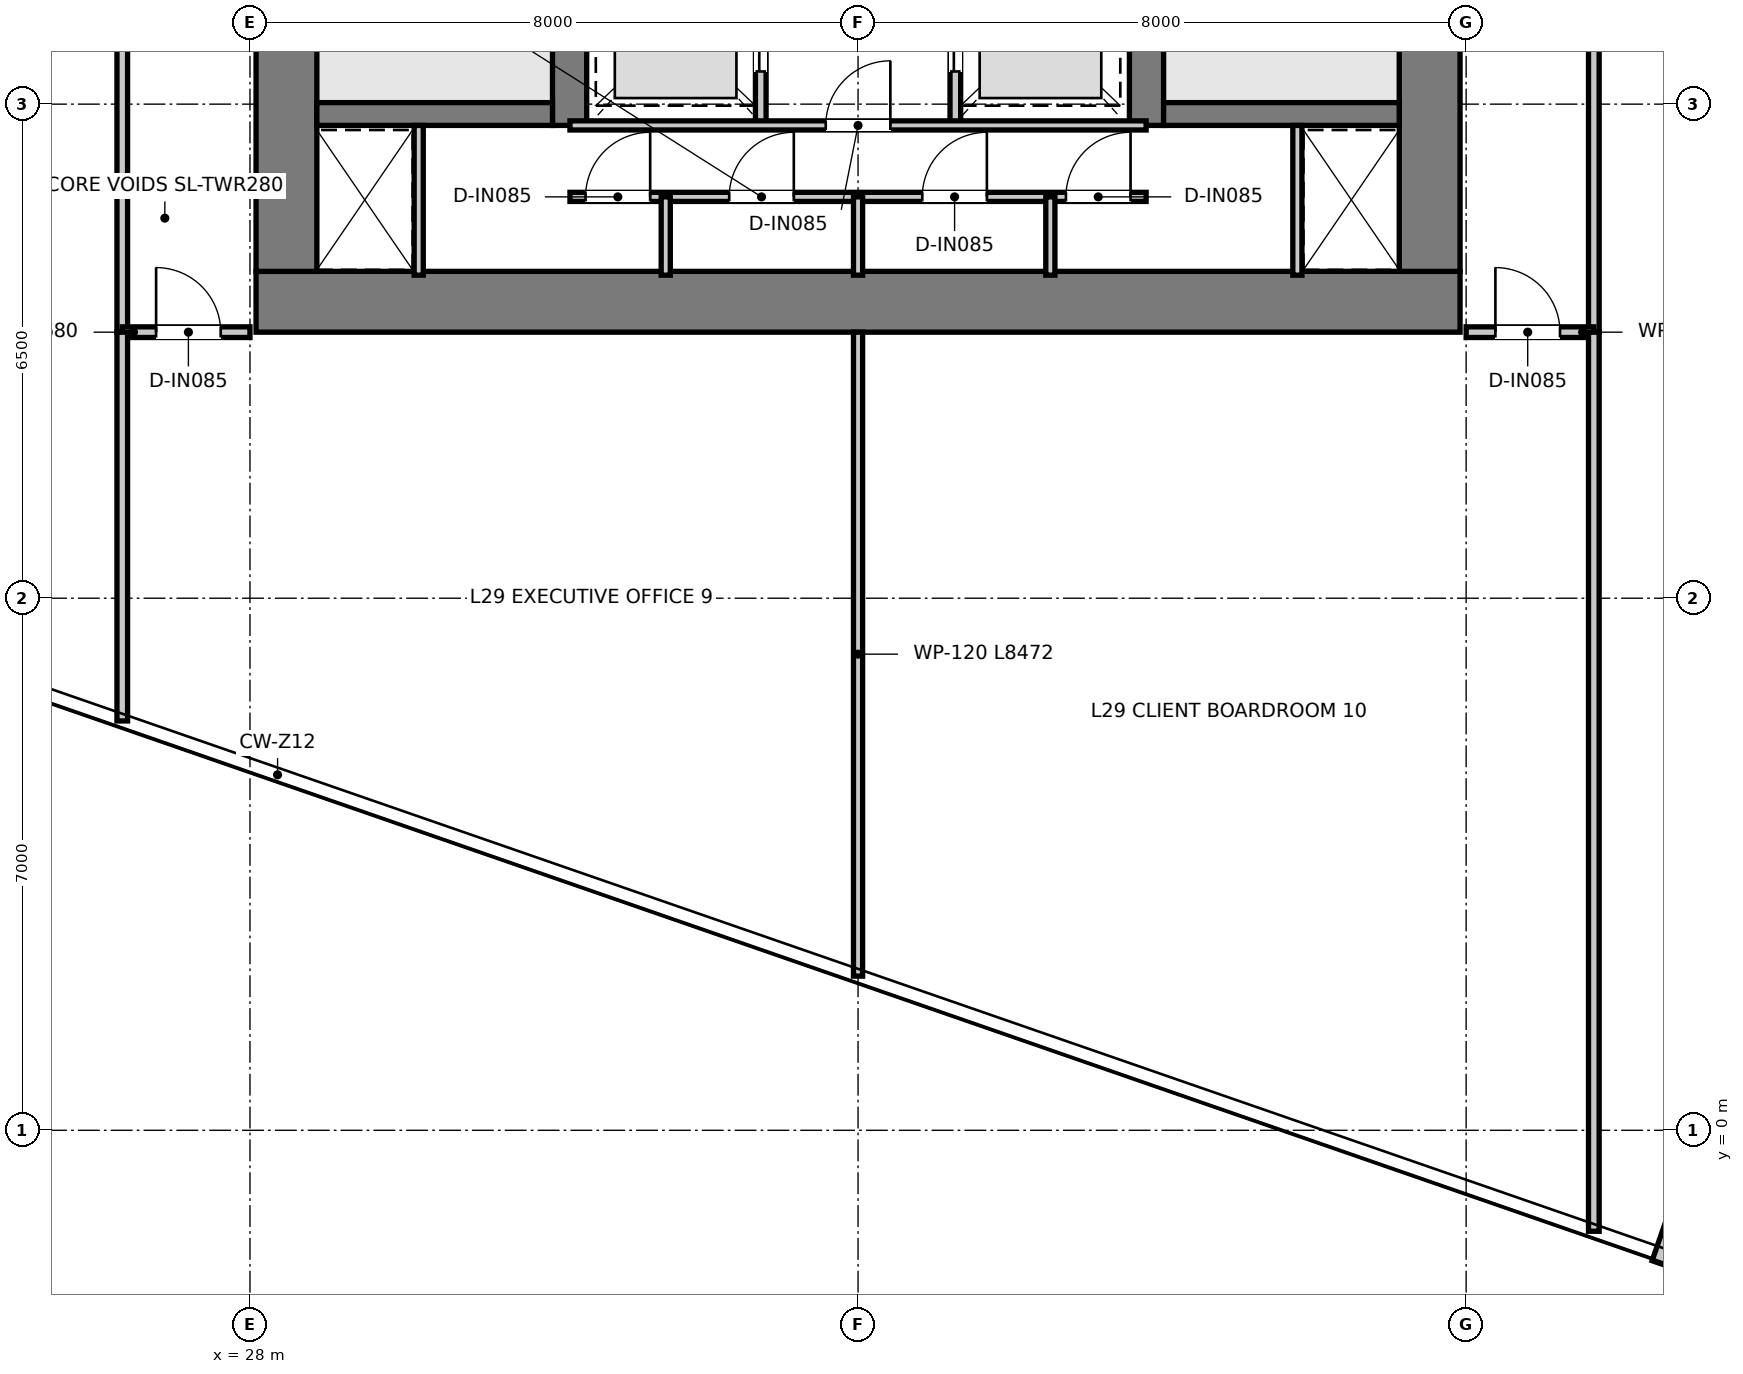
"""IFC4 building model, lengths in metres.
Left out: names, types, materials, properties, quantities, classifications, styles, units other than length and angle.
Written with IfcOpenShell. Run it as: python <this file> out.ifc"""

import sys

from ifc_helpers import new_model, si_unit, direction, frame, frame_2d, origin, place, context, subcontext, project, spatial, rectangle, extrude, element, fill, save


model = new_model("IFC4")
c1 = context("Model", 3, precision=1e-05, world=origin(), true_north=direction((0.0, 1.0)))
c2 = subcontext(c1, "Body", "Model", "MODEL_VIEW")
j1 = project(units=[si_unit("LENGTHUNIT", "METRE"), si_unit("PLANEANGLEUNIT", "RADIAN")], contexts=[c1])
p1 = place(None, origin())
s1 = spatial("IfcSite", under=j1, at=p1, CompositionType="ELEMENT")
p2 = place(p1, origin())
s2 = spatial("IfcBuilding", under=s1, at=p2, CompositionType="ELEMENT")
p3 = place(p2, frame((0.0, 0.0, 121.65)))
s3 = spatial("IfcBuildingStorey", under=s2, at=p3, CompositionType="ELEMENT", Elevation=121.65)
p4 = place(p3, frame((28.08, 10.9, 0.0), z_axis=(0.0, 0.0, 1.0), x_axis=(1.0, 0.0, 0.0)))
e1 = element("IfcWall", 1, at=p4, inside=s3, PredefinedType="SHEAR", context=c2, shape_type="SweptSolid", body=[
    extrude(rectangle(XDim=15.84, YDim=0.8, at=frame_2d((7.92, 0.0))), origin(), (0.0, 0.0, 1.0), 3.95),
])
for number, where, z_axis, x_axis in (
    (2, (28.48, 11.3, 0.0), (0.0, 0.0, 1.0), (0.0, 1.0, 0.0)),
    (3, (43.52, 11.3, 0.0), (0.0, 0.0, 1.0), (0.0, 1.0, 0.0)),
):
    element("IfcWall", number, at=place(p3, frame(where, z_axis=z_axis, x_axis=x_axis)), inside=s3, PredefinedType="SHEAR", context=c2, shape_type="SweptSolid", body=[
        extrude(rectangle(XDim=14.7, YDim=0.8, at=frame_2d((7.35, 0.0))), origin(), (0.0, 0.0, 1.0), 3.95),
    ])
p5 = place(p3, frame((32.205, 13.22, 0.0), z_axis=(0.0, 0.0, 1.0), x_axis=(0.0, 1.0, 0.0)))
e4 = element("IfcWall", 4, at=p5, inside=s3, PredefinedType="SHEAR", context=c2, shape_type="SweptSolid", body=[
    extrude(rectangle(XDim=12.78, YDim=0.45, at=frame_2d((6.39, 0.0))), origin(), (0.0, 0.0, 1.0), 3.95),
])
p6 = place(p5, frame((10.58, 0.0, 0.0)))
e5 = element("IfcOpeningElement", 5, at=p6, cuts=e4, PredefinedType="OPENING", context=c2, shape_type="SweptSolid", body=[
    extrude(rectangle(XDim=1.1, YDim=2.15, at=frame_2d((0.55, 1.075))), frame((0.0, 0.235, 0.0), z_axis=(0.0, -1.0, 0.0), x_axis=(1.0, 0.0, 0.0)), (0.0, 0.0, 1.0), 0.47),
])
p7 = place(p3, frame((39.795, 13.22, 0.0), z_axis=(0.0, 0.0, 1.0), x_axis=(0.0, 1.0, 0.0)))
e6 = element("IfcWall", 6, at=p7, inside=s3, PredefinedType="SHEAR", context=c2, shape_type="SweptSolid", body=[
    extrude(rectangle(XDim=12.78, YDim=0.45, at=frame_2d((6.39, 0.0))), origin(), (0.0, 0.0, 1.0), 3.95),
])
p8 = place(p7, frame((10.58, 0.0, 0.0)))
e7 = element("IfcOpeningElement", 7, at=p8, cuts=e6, PredefinedType="OPENING", context=c2, shape_type="SweptSolid", body=[
    extrude(rectangle(XDim=1.1, YDim=2.15, at=frame_2d((0.55, 1.075))), frame((0.0, 0.235, 0.0), z_axis=(0.0, -1.0, 0.0), x_axis=(1.0, 0.0, 0.0)), (0.0, 0.0, 1.0), 0.47),
])
for number, where, z_axis, x_axis in (
    (8, (28.88, 13.37, 0.0), (0.0, 0.0, 1.0), (1.0, 0.0, 0.0)),
    (9, (40.02, 13.37, 0.0), (0.0, 0.0, 1.0), (1.0, 0.0, 0.0)),
):
    element("IfcWall", number, at=place(p3, frame(where, z_axis=z_axis, x_axis=x_axis)), inside=s3, PredefinedType="SHEAR", context=c2, shape_type="SweptSolid", body=[
        extrude(rectangle(XDim=3.1, YDim=0.3, at=frame_2d((1.55, 0.0))), origin(), (0.0, 0.0, 1.0), 3.95),
    ])
p9 = place(p3, frame((46.551, -1.752, 0.0), z_axis=(0.0, 0.0, 1.0), x_axis=(0.327661647146, 0.944795133873, 0.0)))
e10 = element("IfcWall", 10, at=p9, inside=s3, PredefinedType="ELEMENTEDWALL", context=c2, shape_type="SweptSolid", body=[
    extrude(rectangle(XDim=4.245, YDim=0.22, at=frame_2d((2.123, 0.0))), origin(), (0.0, 0.0, 1.0), 3.67),
])
p10 = place(p3, frame((34.72, 13.22, 0.0), z_axis=(0.0, 0.0, 1.0), x_axis=(0.0, 1.0, 0.0)))
e11 = element("IfcWall", 11, at=p10, inside=s3, PredefinedType="PARTITIONING", context=c2, shape_type="SweptSolid", body=[
    extrude(rectangle(XDim=4.56, YDim=0.14, at=frame_2d((2.28, 0.0))), origin(), (0.0, 0.0, 1.0), 3.67),
])
p11 = place(p10, frame((0.71, 0.0, 0.0)))
e12 = element("IfcOpeningElement", 12, at=p11, cuts=e11, PredefinedType="OPENING", context=c2, shape_type="SweptSolid", body=[
    extrude(rectangle(XDim=1.1, YDim=2.15, at=frame_2d((0.55, 1.075))), frame((0.0, 0.08, 0.0), z_axis=(0.0, -1.0, 0.0), x_axis=(1.0, 0.0, 0.0)), (0.0, 0.0, 1.0), 0.16),
])
p12 = place(p10, frame((2.91, 0.0, 0.0)))
e13 = element("IfcOpeningElement", 13, at=p12, cuts=e11, PredefinedType="OPENING", context=c2, shape_type="SweptSolid", body=[
    extrude(rectangle(XDim=1.1, YDim=2.15, at=frame_2d((0.55, 1.075))), frame((0.0, 0.08, 0.0), z_axis=(0.0, -1.0, 0.0), x_axis=(1.0, 0.0, 0.0)), (0.0, 0.0, 1.0), 0.16),
])
p13 = place(p3, frame((37.28, 13.22, 0.0), z_axis=(0.0, 0.0, 1.0), x_axis=(0.0, 1.0, 0.0)))
e14 = element("IfcWall", 14, at=p13, inside=s3, PredefinedType="PARTITIONING", context=c2, shape_type="SweptSolid", body=[
    extrude(rectangle(XDim=4.56, YDim=0.14, at=frame_2d((2.28, 0.0))), origin(), (0.0, 0.0, 1.0), 3.67),
])
p14 = place(p13, frame((0.71, 0.0, 0.0)))
e15 = element("IfcOpeningElement", 15, at=p14, cuts=e14, PredefinedType="OPENING", context=c2, shape_type="SweptSolid", body=[
    extrude(rectangle(XDim=1.1, YDim=2.15, at=frame_2d((0.55, 1.075))), frame((0.0, 0.08, 0.0), z_axis=(0.0, -1.0, 0.0), x_axis=(1.0, 0.0, 0.0)), (0.0, 0.0, 1.0), 0.16),
])
p15 = place(p13, frame((2.91, 0.0, 0.0)))
e16 = element("IfcOpeningElement", 16, at=p15, cuts=e14, PredefinedType="OPENING", context=c2, shape_type="SweptSolid", body=[
    extrude(rectangle(XDim=1.1, YDim=2.15, at=frame_2d((0.55, 1.075))), frame((0.0, 0.08, 0.0), z_axis=(0.0, -1.0, 0.0), x_axis=(1.0, 0.0, 0.0)), (0.0, 0.0, 1.0), 0.16),
])
for number, where, z_axis, x_axis in (
    (17, (30.22, 11.25, 0.0), (0.0, 0.0, 1.0), (0.0, 1.0, 0.0)),
    (18, (41.78, 11.25, 0.0), (0.0, 0.0, 1.0), (0.0, 1.0, 0.0)),
):
    element("IfcWall", number, at=place(p3, frame(where, z_axis=z_axis, x_axis=x_axis)), inside=s3, PredefinedType="PARTITIONING", context=c2, shape_type="SweptSolid", body=[
        extrude(rectangle(XDim=1.97, YDim=0.12, at=frame_2d((0.985, 0.0))), origin(), (0.0, 0.0, 1.0), 3.67),
    ])
p16 = place(p3, frame((32.21, 13.22, 0.0), z_axis=(0.0, 0.0, 1.0), x_axis=(1.0, 0.0, 0.0)))
e19 = element("IfcWall", 19, at=p16, inside=s3, PredefinedType="PARTITIONING", context=c2, shape_type="SweptSolid", body=[
    extrude(rectangle(XDim=7.58, YDim=0.12, at=frame_2d((3.79, 0.0))), origin(), (0.0, 0.0, 1.0), 3.67),
])
p17 = place(p16, frame((3.365, 0.0, 0.0)))
e20 = element("IfcOpeningElement", 20, at=p17, cuts=e19, PredefinedType="OPENING", context=c2, shape_type="SweptSolid", body=[
    extrude(rectangle(XDim=0.85, YDim=2.1, at=frame_2d((0.425, 1.05))), frame((0.0, 0.07, 0.0), z_axis=(0.0, -1.0, 0.0), x_axis=(1.0, 0.0, 0.0)), (0.0, 0.0, 1.0), 0.14),
])
p18 = place(p3, frame((32.21, 12.28, 0.0), z_axis=(0.0, 0.0, 1.0), x_axis=(1.0, 0.0, 0.0)))
e21 = element("IfcWall", 21, at=p18, inside=s3, PredefinedType="PARTITIONING", context=c2, shape_type="SweptSolid", body=[
    extrude(rectangle(XDim=7.58, YDim=0.12, at=frame_2d((3.79, 0.0))), origin(), (0.0, 0.0, 1.0), 3.67),
])
p19 = place(p18, frame((0.205, 0.0, 0.0)))
e22 = element("IfcOpeningElement", 22, at=p19, cuts=e21, PredefinedType="OPENING", context=c2, shape_type="SweptSolid", body=[
    extrude(rectangle(XDim=0.85, YDim=2.1, at=frame_2d((0.425, 1.05))), frame((0.0, 0.07, 0.0), z_axis=(0.0, -1.0, 0.0), x_axis=(1.0, 0.0, 0.0)), (0.0, 0.0, 1.0), 0.14),
])
p20 = place(p18, frame((2.095, 0.0, 0.0)))
e23 = element("IfcOpeningElement", 23, at=p20, cuts=e21, PredefinedType="OPENING", context=c2, shape_type="SweptSolid", body=[
    extrude(rectangle(XDim=0.85, YDim=2.1, at=frame_2d((0.425, 1.05))), frame((0.0, 0.07, 0.0), z_axis=(0.0, -1.0, 0.0), x_axis=(1.0, 0.0, 0.0)), (0.0, 0.0, 1.0), 0.14),
])
p21 = place(p18, frame((4.635, 0.0, 0.0)))
e24 = element("IfcOpeningElement", 24, at=p21, cuts=e21, PredefinedType="OPENING", context=c2, shape_type="SweptSolid", body=[
    extrude(rectangle(XDim=0.85, YDim=2.1, at=frame_2d((0.425, 1.05))), frame((0.0, 0.07, 0.0), z_axis=(0.0, -1.0, 0.0), x_axis=(1.0, 0.0, 0.0)), (0.0, 0.0, 1.0), 0.14),
])
p22 = place(p18, frame((6.525, 0.0, 0.0)))
e25 = element("IfcOpeningElement", 25, at=p22, cuts=e21, PredefinedType="OPENING", context=c2, shape_type="SweptSolid", body=[
    extrude(rectangle(XDim=0.85, YDim=2.1, at=frame_2d((0.425, 1.05))), frame((0.0, 0.07, 0.0), z_axis=(0.0, -1.0, 0.0), x_axis=(1.0, 0.0, 0.0)), (0.0, 0.0, 1.0), 0.14),
])
for number, where, z_axis, x_axis in (
    (26, (33.47, 11.25, 0.0), (0.0, 0.0, 1.0), (0.0, 1.0, 0.0)),
    (27, (36.0, 11.25, 0.0), (0.0, 0.0, 1.0), (0.0, 1.0, 0.0)),
    (28, (38.53, 11.25, 0.0), (0.0, 0.0, 1.0), (0.0, 1.0, 0.0)),
):
    element("IfcWall", number, at=place(p3, frame(where, z_axis=z_axis, x_axis=x_axis)), inside=s3, PredefinedType="PARTITIONING", context=c2, shape_type="SweptSolid", body=[
        extrude(rectangle(XDim=1.03, YDim=0.12, at=frame_2d((0.515, 0.0))), origin(), (0.0, 0.0, 1.0), 3.67),
    ])
p23 = place(p3, frame((26.32, 10.5, 0.0), z_axis=(0.0, 0.0, 1.0), x_axis=(0.0, 1.0, 0.0)))
e29 = element("IfcWall", 29, at=p23, inside=s3, PredefinedType="PARTITIONING", context=c2, shape_type="SweptSolid", body=[
    extrude(rectangle(XDim=25.62, YDim=0.14, at=frame_2d((12.81, 0.0))), origin(), (0.0, 0.0, 1.0), 2.97),
])
p24 = place(p23, frame((15.125, 0.0, 0.0)))
e30 = element("IfcOpeningElement", 30, at=p24, cuts=e29, PredefinedType="OPENING", context=c2, shape_type="SweptSolid", body=[
    extrude(rectangle(XDim=0.95, YDim=2.1, at=frame_2d((0.475, 1.05))), frame((0.0, 0.08, 0.0), z_axis=(0.0, -1.0, 0.0), x_axis=(1.0, 0.0, 0.0)), (0.0, 0.0, 1.0), 0.16),
])
p25 = place(p3, frame((45.68, 10.5, 0.0), z_axis=(0.0, 0.0, 1.0), x_axis=(0.0, 1.0, 0.0)))
e31 = element("IfcWall", 31, at=p25, inside=s3, PredefinedType="PARTITIONING", context=c2, shape_type="SweptSolid", body=[
    extrude(rectangle(XDim=25.62, YDim=0.14, at=frame_2d((12.81, 0.0))), origin(), (0.0, 0.0, 1.0), 2.97),
])
p26 = place(p25, frame((9.525, 0.0, 0.0)))
e32 = element("IfcOpeningElement", 32, at=p26, cuts=e31, PredefinedType="OPENING", context=c2, shape_type="SweptSolid", body=[
    extrude(rectangle(XDim=0.95, YDim=2.1, at=frame_2d((0.475, 1.05))), frame((0.0, 0.08, 0.0), z_axis=(0.0, -1.0, 0.0), x_axis=(1.0, 0.0, 0.0)), (0.0, 0.0, 1.0), 0.16),
])
p27 = place(p25, frame((16.525, 0.0, 0.0)))
e33 = element("IfcOpeningElement", 33, at=p27, cuts=e31, PredefinedType="OPENING", context=c2, shape_type="SweptSolid", body=[
    extrude(rectangle(XDim=0.95, YDim=2.1, at=frame_2d((0.475, 1.05))), frame((0.0, 0.08, 0.0), z_axis=(0.0, -1.0, 0.0), x_axis=(1.0, 0.0, 0.0)), (0.0, 0.0, 1.0), 0.16),
])
p28 = place(p25, frame((22.125, 0.0, 0.0)))
e34 = element("IfcOpeningElement", 34, at=p28, cuts=e31, PredefinedType="OPENING", context=c2, shape_type="SweptSolid", body=[
    extrude(rectangle(XDim=0.95, YDim=2.1, at=frame_2d((0.475, 1.05))), frame((0.0, 0.08, 0.0), z_axis=(0.0, -1.0, 0.0), x_axis=(1.0, 0.0, 0.0)), (0.0, 0.0, 1.0), 0.16),
])
p29 = place(p3, frame((26.32, 10.5, 0.0), z_axis=(0.0, 0.0, 1.0), x_axis=(1.0, 0.0, 0.0)))
e35 = element("IfcWall", 35, at=p29, inside=s3, PredefinedType="PARTITIONING", context=c2, shape_type="SweptSolid", body=[
    extrude(rectangle(XDim=1.68, YDim=0.14, at=frame_2d((0.84, 0.0))), origin(), (0.0, 0.0, 1.0), 3.67),
])
p30 = place(p29, frame((0.445, 0.0, 0.0)))
e36 = element("IfcOpeningElement", 36, at=p30, cuts=e35, PredefinedType="OPENING", context=c2, shape_type="SweptSolid", body=[
    extrude(rectangle(XDim=0.85, YDim=2.1, at=frame_2d((0.425, 1.05))), frame((0.0, 0.08, 0.0), z_axis=(0.0, -1.0, 0.0), x_axis=(1.0, 0.0, 0.0)), (0.0, 0.0, 1.0), 0.16),
])
p31 = place(p3, frame((44.0, 10.5, 0.0), z_axis=(0.0, 0.0, 1.0), x_axis=(1.0, 0.0, 0.0)))
e37 = element("IfcWall", 37, at=p31, inside=s3, PredefinedType="PARTITIONING", context=c2, shape_type="SweptSolid", body=[
    extrude(rectangle(XDim=1.68, YDim=0.14, at=frame_2d((0.84, 0.0))), origin(), (0.0, 0.0, 1.0), 3.67),
])
p32 = place(p31, frame((0.385, 0.0, 0.0)))
e38 = element("IfcOpeningElement", 38, at=p32, cuts=e37, PredefinedType="OPENING", context=c2, shape_type="SweptSolid", body=[
    extrude(rectangle(XDim=0.85, YDim=2.1, at=frame_2d((0.425, 1.05))), frame((0.0, 0.08, 0.0), z_axis=(0.0, -1.0, 0.0), x_axis=(1.0, 0.0, 0.0)), (0.0, 0.0, 1.0), 0.16),
])
p33 = place(p3, frame((26.32, 5.385, 0.0), z_axis=(0.0, 0.0, 1.0), x_axis=(0.0, 1.0, 0.0)))
e39 = element("IfcWall", 39, at=p33, inside=s3, PredefinedType="PARTITIONING", context=c2, shape_type="SweptSolid", body=[
    extrude(rectangle(XDim=5.115, YDim=0.14, at=frame_2d((2.558, 0.0))), origin(), (0.0, 0.0, 1.0), 3.67),
])
p34 = place(p3, frame((45.68, -1.329, 0.0), z_axis=(0.0, 0.0, 1.0), x_axis=(0.0, 1.0, 0.0)))
e40 = element("IfcWall", 40, at=p34, inside=s3, PredefinedType="PARTITIONING", context=c2, shape_type="SweptSolid", body=[
    extrude(rectangle(XDim=11.829, YDim=0.14, at=frame_2d((5.914, 0.0))), origin(), (0.0, 0.0, 1.0), 3.67),
])
p35 = place(p3, frame((36.0, 2.028, 0.0), z_axis=(0.0, 0.0, 1.0), x_axis=(0.0, 1.0, 0.0)))
e41 = element("IfcWall", 41, at=p35, inside=s3, PredefinedType="PARTITIONING", context=c2, shape_type="SweptSolid", body=[
    extrude(rectangle(XDim=8.472, YDim=0.12, at=frame_2d((4.236, 0.0))), origin(), (0.0, 0.0, 1.0), 3.67),
])
p36 = place(p11, origin())
e42 = element("IfcDoor", 42, at=p36, inside=s3, OperationType="DOUBLE_DOOR_SLIDING", PredefinedType="DOOR", context=c2, shape_type="SweptSolid", body=[
    extrude(rectangle(XDim=1.1, YDim=2.15, at=frame_2d((0.55, 1.075))), frame((0.0, 0.025, 0.0), z_axis=(0.0, -1.0, 0.0), x_axis=(1.0, 0.0, 0.0)), (0.0, 0.0, 1.0), 0.05),
])
fill(e12, e42)
p37 = place(p14, origin())
e43 = element("IfcDoor", 43, at=p37, inside=s3, OperationType="DOUBLE_DOOR_SLIDING", PredefinedType="DOOR", context=c2, shape_type="SweptSolid", body=[
    extrude(rectangle(XDim=1.1, YDim=2.15, at=frame_2d((0.55, 1.075))), frame((0.0, 0.025, 0.0), z_axis=(0.0, -1.0, 0.0), x_axis=(1.0, 0.0, 0.0)), (0.0, 0.0, 1.0), 0.05),
])
fill(e15, e43)
p38 = place(p17, origin())
e44 = element("IfcDoor", 44, at=p38, inside=s3, OperationType="SINGLE_SWING_RIGHT", PredefinedType="DOOR", context=c2, shape_type="SweptSolid", body=[
    extrude(rectangle(XDim=0.85, YDim=2.1, at=frame_2d((0.425, 1.05))), frame((0.0, 0.025, 0.0), z_axis=(0.0, -1.0, 0.0), x_axis=(1.0, 0.0, 0.0)), (0.0, 0.0, 1.0), 0.05),
])
fill(e20, e44)
p39 = place(p19, origin())
e45 = element("IfcDoor", 45, at=p39, inside=s3, OperationType="SINGLE_SWING_RIGHT", PredefinedType="DOOR", context=c2, shape_type="SweptSolid", body=[
    extrude(rectangle(XDim=0.85, YDim=2.1, at=frame_2d((0.425, 1.05))), frame((0.0, 0.025, 0.0), z_axis=(0.0, -1.0, 0.0), x_axis=(1.0, 0.0, 0.0)), (0.0, 0.0, 1.0), 0.05),
])
fill(e22, e45)
p40 = place(p20, origin())
e46 = element("IfcDoor", 46, at=p40, inside=s3, OperationType="SINGLE_SWING_RIGHT", PredefinedType="DOOR", context=c2, shape_type="SweptSolid", body=[
    extrude(rectangle(XDim=0.85, YDim=2.1, at=frame_2d((0.425, 1.05))), frame((0.0, 0.025, 0.0), z_axis=(0.0, -1.0, 0.0), x_axis=(1.0, 0.0, 0.0)), (0.0, 0.0, 1.0), 0.05),
])
fill(e23, e46)
p41 = place(p21, origin())
e47 = element("IfcDoor", 47, at=p41, inside=s3, OperationType="SINGLE_SWING_RIGHT", PredefinedType="DOOR", context=c2, shape_type="SweptSolid", body=[
    extrude(rectangle(XDim=0.85, YDim=2.1, at=frame_2d((0.425, 1.05))), frame((0.0, 0.025, 0.0), z_axis=(0.0, -1.0, 0.0), x_axis=(1.0, 0.0, 0.0)), (0.0, 0.0, 1.0), 0.05),
])
fill(e24, e47)
p42 = place(p22, origin())
e48 = element("IfcDoor", 48, at=p42, inside=s3, OperationType="SINGLE_SWING_RIGHT", PredefinedType="DOOR", context=c2, shape_type="SweptSolid", body=[
    extrude(rectangle(XDim=0.85, YDim=2.1, at=frame_2d((0.425, 1.05))), frame((0.0, 0.025, 0.0), z_axis=(0.0, -1.0, 0.0), x_axis=(1.0, 0.0, 0.0)), (0.0, 0.0, 1.0), 0.05),
])
fill(e25, e48)
p43 = place(p30, origin())
e49 = element("IfcDoor", 49, at=p43, inside=s3, OperationType="SINGLE_SWING_LEFT", PredefinedType="DOOR", context=c2, shape_type="SweptSolid", body=[
    extrude(rectangle(XDim=0.85, YDim=2.1, at=frame_2d((0.425, 1.05))), frame((0.0, 0.025, 0.0), z_axis=(0.0, -1.0, 0.0), x_axis=(1.0, 0.0, 0.0)), (0.0, 0.0, 1.0), 0.05),
])
fill(e36, e49)
p44 = place(p32, origin())
e50 = element("IfcDoor", 50, at=p44, inside=s3, OperationType="SINGLE_SWING_LEFT", PredefinedType="DOOR", context=c2, shape_type="SweptSolid", body=[
    extrude(rectangle(XDim=0.85, YDim=2.1, at=frame_2d((0.425, 1.05))), frame((0.0, 0.025, 0.0), z_axis=(0.0, -1.0, 0.0), x_axis=(1.0, 0.0, 0.0)), (0.0, 0.0, 1.0), 0.05),
])
fill(e38, e50)
save(model, sys.argv[1])
